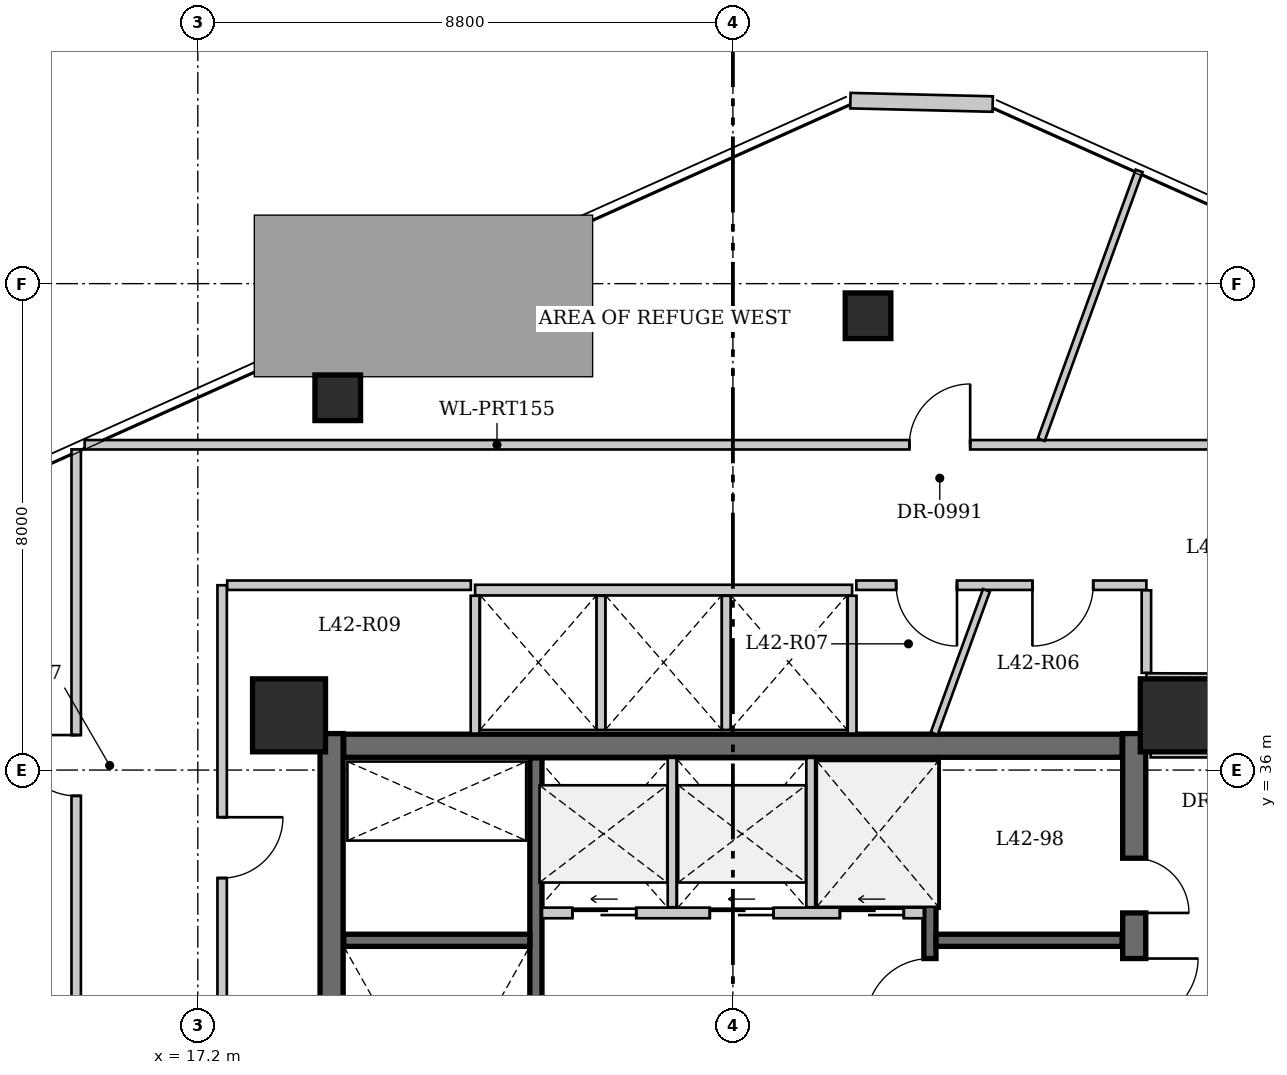
"""IFC4 building model, lengths in metres.
Left out: names, types, materials, properties, quantities, classifications, styles, units other than length and angle.
Written with IfcOpenShell. Run it as: python <this file> out.ifc"""

import sys

from ifc_helpers import new_model, si_unit, direction, frame, frame_2d, origin, origin_2d, place, context, subcontext, project, spatial, rectangle, hollow_rectangle, extrude, source, transform, mapped, element, fill, save


model = new_model("IFC4")
c1 = context("Model", 3, precision=1e-05, world=origin(), true_north=direction((0.0, 1.0)))
c2 = subcontext(c1, "Body", "Model", "MODEL_VIEW")
j1 = project(units=[si_unit("LENGTHUNIT", "METRE"), si_unit("PLANEANGLEUNIT", "RADIAN")], contexts=[c1])
p1 = place(None, origin())
s1 = spatial("IfcSite", under=j1, at=p1, CompositionType="ELEMENT")
p2 = place(p1, origin())
s2 = spatial("IfcBuilding", under=s1, at=p2, CompositionType="ELEMENT")
p3 = place(p2, frame((0.0, 0.0, 162.4)))
s3 = spatial("IfcBuildingStorey", under=s2, at=p3, CompositionType="ELEMENT", Elevation=162.4)
for number, where, z_axis, x_axis in (
    (1, (19.501, 42.123, 0.0), (0.0, 0.0, 1.0), (1.0, 0.0, 0.0)),
    (2, (28.222, 43.472, 0.0), (0.0, 0.0, 1.0), (1.0, 0.0, 0.0)),
):
    element("IfcColumn", number, at=place(p3, frame(where, z_axis=z_axis, x_axis=x_axis)), inside=s3, PredefinedType="COLUMN", context=c2, shape_type="SweptSolid", body=[
        extrude(hollow_rectangle(XDim=0.75, YDim=0.75, WallThickness=0.04, at=origin_2d()), origin(), (0.0, 0.0, 1.0), 4.15),
    ])
for number, where, z_axis, x_axis in (
    (3, (33.3, 36.9, 0.0), (0.0, 0.0, 1.0), (1.0, 0.0, 0.0)),
    (4, (18.7, 36.9, 0.0), (0.0, 0.0, 1.0), (1.0, 0.0, 0.0)),
):
    element("IfcColumn", number, at=place(p3, frame(where, z_axis=z_axis, x_axis=x_axis)), inside=s3, PredefinedType="COLUMN", context=c2, shape_type="SweptSolid", body=[
        extrude(rectangle(XDim=1.2, YDim=1.2, at=origin_2d()), origin(), (0.0, 0.0, 1.0), 4.15),
    ])
p4 = place(p3, frame((27.932, 47.01, 0.0), z_axis=(0.0, 0.0, 1.0), x_axis=(0.999709717673, -0.024093160645, 0.0)))
e5 = element("IfcWall", 5, at=p4, inside=s3, PredefinedType="SOLIDWALL", context=c2, shape_type="SweptSolid", body=[
    extrude(rectangle(XDim=2.341, YDim=0.255, at=frame_2d((1.17, 0.0))), origin(), (0.0, 0.0, 1.0), 4.15),
])
p5 = place(p3, frame((19.4, 25.8, 0.0), z_axis=(0.0, 0.0, 1.0), x_axis=(0.0, 1.0, 0.0)))
e6 = element("IfcWall", 6, at=p5, inside=s3, PredefinedType="SHEAR", context=c2, shape_type="SweptSolid", body=[
    extrude(rectangle(XDim=10.8, YDim=0.38, at=frame_2d((5.4, 0.0))), origin(), (0.0, 0.0, 1.0), 4.6),
])
p6 = place(p3, frame((32.6, 36.6, 0.0), z_axis=(0.0, 0.0, 1.0), x_axis=(0.0, -1.0, 0.0)))
e7 = element("IfcWall", 7, at=p6, inside=s3, PredefinedType="SHEAR", context=c2, shape_type="SweptSolid", body=[
    extrude(rectangle(XDim=10.8, YDim=0.38, at=frame_2d((5.4, 0.0))), origin(), (0.0, 0.0, 1.0), 4.6),
])
p7 = place(p6, frame((3.7, 0.0, 0.0)))
e8 = element("IfcOpeningElement", 8, at=p7, cuts=e7, PredefinedType="OPENING", context=c2, shape_type="SweptSolid", body=[
    extrude(rectangle(XDim=1.05, YDim=2.15, at=frame_2d((0.525, 1.075))), frame((0.0, 0.2, 0.0), z_axis=(0.0, -1.0, 0.0), x_axis=(1.0, 0.0, 0.0)), (0.0, 0.0, 1.0), 0.4),
])
p8 = place(p6, frame((2.05, 0.0, 0.0)))
e9 = element("IfcOpeningElement", 9, at=p8, cuts=e7, PredefinedType="OPENING", context=c2, shape_type="SweptSolid", body=[
    extrude(rectangle(XDim=0.9, YDim=2.1, at=frame_2d((0.45, 1.05))), frame((0.0, 0.2, 0.0), z_axis=(0.0, -1.0, 0.0), x_axis=(1.0, 0.0, 0.0)), (0.0, 0.0, 1.0), 0.4),
])
p9 = place(p3, frame((19.6, 36.4, 0.0), z_axis=(0.0, 0.0, 1.0), x_axis=(1.0, 0.0, 0.0)))
e10 = element("IfcWall", 10, at=p9, inside=s3, PredefinedType="SHEAR", context=c2, shape_type="SweptSolid", body=[
    extrude(rectangle(XDim=12.8, YDim=0.38, at=frame_2d((6.4, 0.0))), origin(), (0.0, 0.0, 1.0), 4.6),
])
p10 = place(p3, frame((22.76, 26.2, 0.0), z_axis=(0.0, 0.0, 1.0), x_axis=(0.0, 1.0, 0.0)))
e11 = element("IfcWall", 11, at=p10, inside=s3, PredefinedType="SHEAR", context=c2, shape_type="SweptSolid", body=[
    extrude(rectangle(XDim=10.0, YDim=0.2, at=frame_2d((5.0, 0.0))), origin(), (0.0, 0.0, 1.0), 4.6),
])
p11 = place(p3, frame((29.24, 26.2, 0.0), z_axis=(0.0, 0.0, 1.0), x_axis=(0.0, 1.0, 0.0)))
e12 = element("IfcWall", 12, at=p11, inside=s3, PredefinedType="SHEAR", context=c2, shape_type="SweptSolid", body=[
    extrude(rectangle(XDim=10.0, YDim=0.2, at=frame_2d((5.0, 0.0))), origin(), (0.0, 0.0, 1.0), 4.6),
])
p12 = place(p11, frame((5.65, 0.0, 0.0)))
e13 = element("IfcOpeningElement", 13, at=p12, cuts=e12, PredefinedType="OPENING", context=c2, shape_type="SweptSolid", body=[
    extrude(rectangle(XDim=1.05, YDim=2.15, at=frame_2d((0.525, 1.075))), frame((0.0, 0.11, 0.0), z_axis=(0.0, -1.0, 0.0), x_axis=(1.0, 0.0, 0.0)), (0.0, 0.0, 1.0), 0.22),
])
for number, where, z_axis, x_axis in (
    (14, (19.6, 33.2, 0.0), (0.0, 0.0, 1.0), (1.0, 0.0, 0.0)),
    (15, (29.34, 33.2, 0.0), (0.0, 0.0, 1.0), (1.0, 0.0, 0.0)),
):
    element("IfcWall", number, at=place(p3, frame(where, z_axis=z_axis, x_axis=x_axis)), inside=s3, PredefinedType="SHEAR", context=c2, shape_type="SweptSolid", body=[
        extrude(rectangle(XDim=3.06, YDim=0.2, at=frame_2d((1.53, 0.0))), origin(), (0.0, 0.0, 1.0), 4.6),
    ])
p13 = place(p3, frame((22.86, 33.65, 0.0), z_axis=(0.0, 0.0, 1.0), x_axis=(1.0, 0.0, 0.0)))
e16 = element("IfcWall", 16, at=p13, inside=s3, PredefinedType="SOLIDWALL", context=c2, shape_type="SweptSolid", body=[
    extrude(rectangle(XDim=6.28, YDim=0.175, at=frame_2d((3.14, 0.0))), origin(), (0.0, 0.0, 1.0), 4.15),
])
p14 = place(p13, frame((0.5, 0.0, 0.0)))
e17 = element("IfcOpeningElement", 17, at=p14, cuts=e16, PredefinedType="OPENING", context=c2, shape_type="SweptSolid", body=[
    extrude(rectangle(XDim=1.05, YDim=2.15, at=frame_2d((0.525, 1.075))), frame((0.0, 0.098, 0.0), z_axis=(0.0, -1.0, 0.0), x_axis=(1.0, 0.0, 0.0)), (0.0, 0.0, 1.0), 0.195),
])
p15 = place(p13, frame((2.76, 0.0, 0.0)))
e18 = element("IfcOpeningElement", 18, at=p15, cuts=e16, PredefinedType="OPENING", context=c2, shape_type="SweptSolid", body=[
    extrude(rectangle(XDim=1.05, YDim=2.15, at=frame_2d((0.525, 1.075))), frame((0.0, 0.098, 0.0), z_axis=(0.0, -1.0, 0.0), x_axis=(1.0, 0.0, 0.0)), (0.0, 0.0, 1.0), 0.195),
])
p16 = place(p13, frame((4.9, 0.0, 0.0)))
e19 = element("IfcOpeningElement", 19, at=p16, cuts=e16, PredefinedType="OPENING", context=c2, shape_type="SweptSolid", body=[
    extrude(rectangle(XDim=1.05, YDim=2.15, at=frame_2d((0.525, 1.075))), frame((0.0, 0.098, 0.0), z_axis=(0.0, -1.0, 0.0), x_axis=(1.0, 0.0, 0.0)), (0.0, 0.0, 1.0), 0.195),
])
for number, where, z_axis, x_axis in (
    (20, (25.0, 33.743, 0.0), (0.0, 0.0, 1.0), (0.0, 1.0, 0.0)),
    (21, (27.28, 33.743, 0.0), (0.0, 0.0, 1.0), (0.0, 1.0, 0.0)),
):
    element("IfcWall", number, at=place(p3, frame(where, z_axis=z_axis, x_axis=x_axis)), inside=s3, PredefinedType="SOLIDWALL", context=c2, shape_type="SweptSolid", body=[
        extrude(rectangle(XDim=2.457, YDim=0.145, at=frame_2d((1.228, 0.0))), origin(), (0.0, 0.0, 1.0), 4.15),
    ])
p17 = place(p3, frame((21.76, 38.96, 0.0), z_axis=(0.0, 0.0, 1.0), x_axis=(1.0, 0.0, 0.0)))
e22 = element("IfcWall", 22, at=p17, inside=s3, PredefinedType="SOLIDWALL", context=c2, shape_type="SweptSolid", body=[
    extrude(rectangle(XDim=6.2, YDim=0.175, at=frame_2d((3.1, 0.0))), origin(), (0.0, 0.0, 1.0), 4.15),
])
for number, where, z_axis, x_axis in (
    (23, (21.76, 36.6, 0.0), (0.0, 0.0, 1.0), (0.0, 1.0, 0.0)),
    (24, (27.96, 36.6, 0.0), (0.0, 0.0, 1.0), (0.0, 1.0, 0.0)),
):
    element("IfcWall", number, at=place(p3, frame(where, z_axis=z_axis, x_axis=x_axis)), inside=s3, PredefinedType="SOLIDWALL", context=c2, shape_type="SweptSolid", body=[
        extrude(rectangle(XDim=2.266, YDim=0.145, at=frame_2d((1.133, 0.0))), origin(), (0.0, 0.0, 1.0), 4.15),
    ])
for number, where, z_axis, x_axis in (
    (25, (23.83, 36.66, 0.0), (0.0, 0.0, 1.0), (0.0, 1.0, 0.0)),
    (26, (25.89, 36.66, 0.0), (0.0, 0.0, 1.0), (0.0, 1.0, 0.0)),
):
    element("IfcWall", number, at=place(p3, frame(where, z_axis=z_axis, x_axis=x_axis)), inside=s3, PredefinedType="SOLIDWALL", context=c2, shape_type="SweptSolid", body=[
        extrude(rectangle(XDim=2.207, YDim=0.145, at=frame_2d((1.103, 0.0))), origin(), (0.0, 0.0, 1.0), 4.15),
    ])
p18 = place(p3, frame((15.339, 41.35, 0.0), z_axis=(0.0, 0.0, 1.0), x_axis=(1.0, 0.0, 0.0)))
e27 = element("IfcWall", 27, at=p18, inside=s3, PredefinedType="PARTITIONING", context=c2, shape_type="SweptSolid", body=[
    extrude(rectangle(XDim=20.461, YDim=0.155, at=frame_2d((10.23, 0.0))), origin(), (0.0, 0.0, 1.0), 4.15),
])
p19 = place(p18, frame((13.563, 0.0, 0.0)))
e28 = element("IfcOpeningElement", 28, at=p19, cuts=e27, PredefinedType="OPENING", context=c2, shape_type="SweptSolid", body=[
    extrude(rectangle(XDim=1.0, YDim=2.15, at=frame_2d((0.5, 1.075))), frame((0.0, 0.087, 0.0), z_axis=(0.0, -1.0, 0.0), x_axis=(1.0, 0.0, 0.0)), (0.0, 0.0, 1.0), 0.175),
])
p20 = place(p3, frame((15.2, 23.083, 0.0), z_axis=(0.0, 0.0, 1.0), x_axis=(0.0, 1.0, 0.0)))
e29 = element("IfcWall", 29, at=p20, inside=s3, PredefinedType="PARTITIONING", context=c2, shape_type="SweptSolid", body=[
    extrude(rectangle(XDim=18.19, YDim=0.155, at=frame_2d((9.095, 0.0))), origin(), (0.0, 0.0, 1.0), 4.15),
])
p21 = place(p20, frame((3.706, 0.0, 0.0)))
e30 = element("IfcOpeningElement", 30, at=p21, cuts=e29, PredefinedType="OPENING", context=c2, shape_type="SweptSolid", body=[
    extrude(rectangle(XDim=1.0, YDim=2.15, at=frame_2d((0.5, 1.075))), frame((0.0, 0.087, 0.0), z_axis=(0.0, -1.0, 0.0), x_axis=(1.0, 0.0, 0.0)), (0.0, 0.0, 1.0), 0.175),
])
p22 = place(p20, frame((12.492, 0.0, 0.0)))
e31 = element("IfcOpeningElement", 31, at=p22, cuts=e29, PredefinedType="OPENING", context=c2, shape_type="SweptSolid", body=[
    extrude(rectangle(XDim=1.0, YDim=2.15, at=frame_2d((0.5, 1.075))), frame((0.0, 0.087, 0.0), z_axis=(0.0, -1.0, 0.0), x_axis=(1.0, 0.0, 0.0)), (0.0, 0.0, 1.0), 0.175),
])
p23 = place(p3, frame((32.8, 39.04, 0.0), z_axis=(0.0, 0.0, 1.0), x_axis=(-1.0, 0.0, 0.0)))
e32 = element("IfcWall", 32, at=p23, inside=s3, PredefinedType="PARTITIONING", context=c2, shape_type="SweptSolid", body=[
    extrude(rectangle(XDim=4.77, YDim=0.155, at=frame_2d((2.385, 0.0))), origin(), (0.0, 0.0, 1.0), 4.15),
])
p24 = place(p23, frame((0.875, 0.0, 0.0)))
e33 = element("IfcOpeningElement", 33, at=p24, cuts=e32, PredefinedType="OPENING", context=c2, shape_type="SweptSolid", body=[
    extrude(rectangle(XDim=1.0, YDim=2.15, at=frame_2d((0.5, 1.075))), frame((0.0, 0.087, 0.0), z_axis=(0.0, -1.0, 0.0), x_axis=(1.0, 0.0, 0.0)), (0.0, 0.0, 1.0), 0.175),
])
p25 = place(p23, frame((3.115, 0.0, 0.0)))
e34 = element("IfcOpeningElement", 34, at=p25, cuts=e32, PredefinedType="OPENING", context=c2, shape_type="SweptSolid", body=[
    extrude(rectangle(XDim=1.0, YDim=2.15, at=frame_2d((0.5, 1.075))), frame((0.0, 0.087, 0.0), z_axis=(0.0, -1.0, 0.0), x_axis=(1.0, 0.0, 0.0)), (0.0, 0.0, 1.0), 0.175),
])
p26 = place(p3, frame((17.6, 39.04, 0.0), z_axis=(0.0, 0.0, 1.0), x_axis=(0.0, -1.0, 0.0)))
e35 = element("IfcWall", 35, at=p26, inside=s3, PredefinedType="PARTITIONING", context=c2, shape_type="SweptSolid", body=[
    extrude(rectangle(XDim=13.24, YDim=0.155, at=frame_2d((6.62, 0.0))), origin(), (0.0, 0.0, 1.0), 4.15),
])
p27 = place(p26, frame((3.816, 0.0, 0.0)))
e36 = element("IfcOpeningElement", 36, at=p27, cuts=e35, PredefinedType="OPENING", context=c2, shape_type="SweptSolid", body=[
    extrude(rectangle(XDim=1.0, YDim=2.15, at=frame_2d((0.5, 1.075))), frame((0.0, 0.087, 0.0), z_axis=(0.0, -1.0, 0.0), x_axis=(1.0, 0.0, 0.0)), (0.0, 0.0, 1.0), 0.175),
])
p28 = place(p26, frame((10.292, 0.0, 0.0)))
e37 = element("IfcOpeningElement", 37, at=p28, cuts=e35, PredefinedType="OPENING", context=c2, shape_type="SweptSolid", body=[
    extrude(rectangle(XDim=1.0, YDim=2.15, at=frame_2d((0.5, 1.075))), frame((0.0, 0.087, 0.0), z_axis=(0.0, -1.0, 0.0), x_axis=(1.0, 0.0, 0.0)), (0.0, 0.0, 1.0), 0.175),
])
p29 = place(p3, frame((33.827, 37.511, 0.0), z_axis=(0.0, 0.0, 1.0), x_axis=(-0.99999276797, 0.003803157663, 0.0)))
e38 = element("IfcWall", 38, at=p29, inside=s3, PredefinedType="PARTITIONING", context=c2, shape_type="SweptSolid", body=[
    extrude(rectangle(XDim=1.027, YDim=0.155, at=frame_2d((0.514, 0.0))), origin(), (0.0, 0.0, 1.0), 2.725),
])
p30 = place(p3, frame((32.8, 37.598, 0.0), z_axis=(0.0, 0.0, 1.0), x_axis=(0.0, 1.0, 0.0)))
e39 = element("IfcWall", 39, at=p30, inside=s3, PredefinedType="PARTITIONING", context=c2, shape_type="SweptSolid", body=[
    extrude(rectangle(XDim=1.358, YDim=0.155, at=frame_2d((0.679, 0.0))), origin(), (0.0, 0.0, 1.0), 4.15),
])
p31 = place(p3, frame((21.69, 39.04, 0.0), z_axis=(0.0, 0.0, 1.0), x_axis=(-1.0, 0.0, 0.0)))
e40 = element("IfcWall", 40, at=p31, inside=s3, PredefinedType="PARTITIONING", context=c2, shape_type="SweptSolid", body=[
    extrude(rectangle(XDim=4.006, YDim=0.155, at=frame_2d((2.003, 0.0))), origin(), (0.0, 0.0, 1.0), 4.15),
])
p32 = place(p3, frame((32.87, 36.285, 0.0), z_axis=(0.0, 0.0, 1.0), x_axis=(1.0, 0.0, 0.0)))
e41 = element("IfcWall", 41, at=p32, inside=s3, PredefinedType="PARTITIONING", context=c2, shape_type="SweptSolid", body=[
    extrude(rectangle(XDim=0.946, YDim=0.155, at=frame_2d((0.473, 0.0))), origin(), (0.0, 0.0, 1.0), 2.725),
])
p33 = place(p3, frame((10.029, 33.309, 0.0), z_axis=(0.0, 0.0, 1.0), x_axis=(0.939892148961, -0.341471445836, 0.0)))
e42 = element("IfcWall", 42, at=p33, inside=s3, PredefinedType="PARTITIONING", context=c2, shape_type="SweptSolid", body=[
    extrude(rectangle(XDim=5.413, YDim=0.12, at=frame_2d((2.707, 0.0))), origin(), (0.0, 0.0, 1.0), 4.15),
])
p34 = place(p3, frame((31.07, 41.434, 0.0), z_axis=(0.0, 0.0, 1.0), x_axis=(0.342105504572, 0.939661547442, 0.0)))
e43 = element("IfcWall", 43, at=p34, inside=s3, PredefinedType="PARTITIONING", context=c2, shape_type="SweptSolid", body=[
    extrude(rectangle(XDim=4.705, YDim=0.12, at=frame_2d((2.353, 0.0))), origin(), (0.0, 0.0, 1.0), 4.15),
])
p35 = place(p3, frame((29.31, 36.6, 0.0), z_axis=(0.0, 0.0, 1.0), x_axis=(0.342618216876, 0.939474724229, 0.0)))
e44 = element("IfcWall", 44, at=p35, inside=s3, PredefinedType="PARTITIONING", context=c2, shape_type="SweptSolid", body=[
    extrude(rectangle(XDim=2.508, YDim=0.12, at=frame_2d((1.254, 0.0))), origin(), (0.0, 0.0, 1.0), 4.15),
])
m1 = source(origin(), c2, "Body", "SweptSolid", [
    extrude(rectangle(XDim=1.05, YDim=2.15, at=frame_2d((0.525, 1.075))), frame((0.0, 0.025, 0.0), z_axis=(0.0, -1.0, 0.0), x_axis=(1.0, 0.0, 0.0)), (0.0, 0.0, 1.0), 0.05),
])
p36 = place(p7, origin())
e45 = element("IfcDoor", 45, at=p36, inside=s3, OperationType="SINGLE_SWING_LEFT", PredefinedType="DOOR", context=c2, shape_type="MappedRepresentation", body=[
    mapped(m1, transform((0.0, 0.0, 0.0), x_axis=(1.0, 0.0, 0.0), y_axis=(0.0, 1.0, 0.0), z_axis=(0.0, 0.0, 1.0), scale=1.0)),
])
fill(e8, e45)
p37 = place(p12, origin())
e46 = element("IfcDoor", 46, at=p37, inside=s3, OperationType="SINGLE_SWING_LEFT", PredefinedType="DOOR", context=c2, shape_type="MappedRepresentation", body=[
    mapped(m1, transform((0.0, 0.0, 0.0), x_axis=(1.0, 0.0, 0.0), y_axis=(0.0, 1.0, 0.0), z_axis=(0.0, 0.0, 1.0), scale=1.0)),
])
fill(e13, e46)
m2 = source(origin(), c2, "Body", "SweptSolid", [
    extrude(rectangle(XDim=1.05, YDim=2.15, at=frame_2d((0.525, 1.075))), frame((0.0, 0.025, 0.0), z_axis=(0.0, -1.0, 0.0), x_axis=(1.0, 0.0, 0.0)), (0.0, 0.0, 1.0), 0.05),
])
p38 = place(p14, origin())
e47 = element("IfcDoor", 47, at=p38, inside=s3, OperationType="SLIDING_TO_LEFT", PredefinedType="DOOR", context=c2, shape_type="MappedRepresentation", body=[
    mapped(m2, transform((0.0, 0.0, 0.0), x_axis=(1.0, 0.0, 0.0), y_axis=(0.0, 1.0, 0.0), z_axis=(0.0, 0.0, 1.0), scale=1.0)),
])
fill(e17, e47)
p39 = place(p15, origin())
e48 = element("IfcDoor", 48, at=p39, inside=s3, OperationType="SLIDING_TO_LEFT", PredefinedType="DOOR", context=c2, shape_type="MappedRepresentation", body=[
    mapped(m2, transform((0.0, 0.0, 0.0), x_axis=(1.0, 0.0, 0.0), y_axis=(0.0, 1.0, 0.0), z_axis=(0.0, 0.0, 1.0), scale=1.0)),
])
fill(e18, e48)
p40 = place(p16, origin())
e49 = element("IfcDoor", 49, at=p40, inside=s3, OperationType="SLIDING_TO_LEFT", PredefinedType="DOOR", context=c2, shape_type="MappedRepresentation", body=[
    mapped(m2, transform((0.0, 0.0, 0.0), x_axis=(1.0, 0.0, 0.0), y_axis=(0.0, 1.0, 0.0), z_axis=(0.0, 0.0, 1.0), scale=1.0)),
])
fill(e19, e49)
m3 = source(origin(), c2, "Body", "SweptSolid", [
    extrude(rectangle(XDim=0.9, YDim=2.1, at=frame_2d((0.45, 1.05))), frame((0.0, 0.025, 0.0), z_axis=(0.0, -1.0, 0.0), x_axis=(1.0, 0.0, 0.0)), (0.0, 0.0, 1.0), 0.05),
])
p41 = place(p8, origin())
e50 = element("IfcDoor", 50, at=p41, inside=s3, OperationType="SINGLE_SWING_RIGHT", PredefinedType="DOOR", context=c2, shape_type="MappedRepresentation", body=[
    mapped(m3, transform((0.0, 0.0, 0.0), x_axis=(1.0, 0.0, 0.0), y_axis=(0.0, 1.0, 0.0), z_axis=(0.0, 0.0, 1.0), scale=1.0)),
])
fill(e9, e50)
m4 = source(origin(), c2, "Body", "SweptSolid", [
    extrude(rectangle(XDim=1.0, YDim=2.15, at=frame_2d((0.5, 1.075))), frame((0.0, 0.025, 0.0), z_axis=(0.0, -1.0, 0.0), x_axis=(1.0, 0.0, 0.0)), (0.0, 0.0, 1.0), 0.05),
])
p42 = place(p19, origin())
e51 = element("IfcDoor", 51, at=p42, inside=s3, OperationType="SINGLE_SWING_RIGHT", PredefinedType="DOOR", context=c2, shape_type="MappedRepresentation", body=[
    mapped(m4, transform((0.0, 0.0, 0.0), x_axis=(1.0, 0.0, 0.0), y_axis=(0.0, 1.0, 0.0), z_axis=(0.0, 0.0, 1.0), scale=1.0)),
])
fill(e28, e51)
p43 = place(p22, origin())
e52 = element("IfcDoor", 52, at=p43, inside=s3, OperationType="SINGLE_SWING_RIGHT", PredefinedType="DOOR", context=c2, shape_type="MappedRepresentation", body=[
    mapped(m4, transform((0.0, 0.0, 0.0), x_axis=(1.0, 0.0, 0.0), y_axis=(0.0, 1.0, 0.0), z_axis=(0.0, 0.0, 1.0), scale=1.0)),
])
fill(e31, e52)
p44 = place(p24, origin())
e53 = element("IfcDoor", 53, at=p44, inside=s3, OperationType="SINGLE_SWING_RIGHT", PredefinedType="DOOR", context=c2, shape_type="MappedRepresentation", body=[
    mapped(m4, transform((0.0, 0.0, 0.0), x_axis=(1.0, 0.0, 0.0), y_axis=(0.0, 1.0, 0.0), z_axis=(0.0, 0.0, 1.0), scale=1.0)),
])
fill(e33, e53)
p45 = place(p25, origin())
e54 = element("IfcDoor", 54, at=p45, inside=s3, OperationType="SINGLE_SWING_LEFT", PredefinedType="DOOR", context=c2, shape_type="MappedRepresentation", body=[
    mapped(m4, transform((0.0, 0.0, 0.0), x_axis=(1.0, 0.0, 0.0), y_axis=(0.0, 1.0, 0.0), z_axis=(0.0, 0.0, 1.0), scale=1.0)),
])
fill(e34, e54)
p46 = place(p27, origin())
e55 = element("IfcDoor", 55, at=p46, inside=s3, OperationType="SINGLE_SWING_LEFT", PredefinedType="DOOR", context=c2, shape_type="MappedRepresentation", body=[
    mapped(m4, transform((0.0, 0.0, 0.0), x_axis=(1.0, 0.0, 0.0), y_axis=(0.0, 1.0, 0.0), z_axis=(0.0, 0.0, 1.0), scale=1.0)),
])
fill(e36, e55)
save(model, sys.argv[1])
